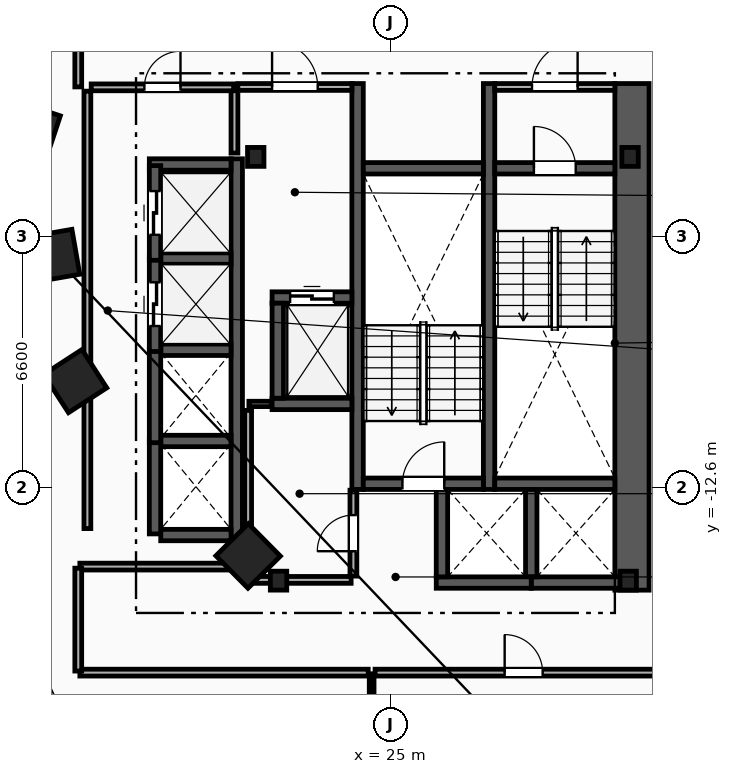
"""IFC4 building model, lengths in metres.
Left out: names, types, materials, properties, quantities, classifications, styles, units other than length and angle.
Written with IfcOpenShell. Run it as: python <this file> out.ifc"""

import sys

from ifc_helpers import new_model, si_unit, direction, frame, frame_2d, origin, origin_2d, place, context, subcontext, project, spatial, rectangle, i_section, extrude, element, fill, save


model = new_model("IFC4")
c1 = context("Model", 3, precision=1e-05, world=origin(), true_north=direction((0.0, 1.0)))
c2 = subcontext(c1, "Body", "Model", "MODEL_VIEW")
j1 = project(units=[si_unit("LENGTHUNIT", "METRE"), si_unit("PLANEANGLEUNIT", "RADIAN")], contexts=[c1])
p1 = place(None, origin())
s1 = spatial("IfcSite", under=j1, at=p1, CompositionType="ELEMENT")
p2 = place(p1, origin())
s2 = spatial("IfcBuilding", under=s1, at=p2, CompositionType="ELEMENT")
p3 = place(p2, frame((0.0, 0.0, 62.0)))
s3 = spatial("IfcBuildingStorey", under=s2, at=p3, CompositionType="ELEMENT", Elevation=62.0)
for number, where, z_axis, x_axis in (
    (1, (31.3, -3.9, 0.0), (0.0, 0.0, 1.0), (1.0, 0.0, 0.0)),
    (2, (21.45, -3.9, 0.0), (0.0, 0.0, 1.0), (1.0, 0.0, 0.0)),
    (3, (22.05, -15.05, 0.0), (0.0, 0.0, 1.0), (1.0, 0.0, 0.0)),
    (4, (31.25, -15.05, 0.0), (0.0, 0.0, 1.0), (1.0, 0.0, 0.0)),
):
    element("IfcColumn", number, at=place(p3, frame(where, z_axis=z_axis, x_axis=x_axis)), inside=s3, PredefinedType="COLUMN", context=c2, shape_type="SweptSolid", body=[
        extrude(i_section(OverallWidth=0.432, OverallDepth=0.498, WebThickness=0.056, FlangeThickness=0.089, FilletRadius=0.018, at=origin_2d()), origin(), (0.0, 0.0, 1.0), 3.8),
    ])
for number, where, z_axis, x_axis in (
    (5, (15.55, -3.2, 0.0), (0.0, 0.0, 1.0), (-0.315, -0.949, 0.0)),
    (6, (16.125, -6.5, 0.0), (0.0, 0.0, 1.0), (0.172, -0.985, 0.0)),
    (7, (16.7, -9.8, 0.0), (0.0, 0.0, 1.0), (0.544, -0.839, 0.0)),
    (8, (21.25, -14.4, 0.0), (0.0, 0.0, 1.0), (0.703, -0.711, 0.0)),
):
    element("IfcColumn", number, at=place(p3, frame(where, z_axis=z_axis, x_axis=x_axis)), inside=s3, PredefinedType="COLUMN", context=c2, shape_type="SweptSolid", body=[
        extrude(rectangle(XDim=1.2, YDim=1.2, at=origin_2d()), origin(), (0.0, 0.0, 1.0), 3.8),
    ])
p4 = place(p3, frame((31.35, -15.3, 0.0), z_axis=(0.0, 0.0, 1.0), x_axis=(0.0, 1.0, 0.0)))
e9 = element("IfcWall", 9, at=p4, inside=s3, PredefinedType="SHEAR", context=c2, shape_type="SweptSolid", body=[
    extrude(rectangle(XDim=13.33, YDim=0.9, at=frame_2d((6.665, 0.0))), origin(), (0.0, 0.0, 1.0), 3.5),
])
for number, where, z_axis, x_axis in (
    (10, (27.59, -12.65, 0.0), (0.0, 0.0, 1.0), (0.0, 1.0, 0.0)),
    (11, (24.13, -12.65, 0.0), (0.0, 0.0, 1.0), (0.0, 1.0, 0.0)),
):
    element("IfcWall", number, at=place(p3, frame(where, z_axis=z_axis, x_axis=x_axis)), inside=s3, PredefinedType="SHEAR", context=c2, shape_type="SweptSolid", body=[
        extrude(rectangle(XDim=10.68, YDim=0.3, at=frame_2d((5.34, 0.0))), origin(), (0.0, 0.0, 1.0), 3.5),
    ])
p5 = place(p3, frame((27.74, -4.2, 0.0), z_axis=(0.0, 0.0, 1.0), x_axis=(1.0, 0.0, 0.0)))
e12 = element("IfcWall", 12, at=p5, inside=s3, PredefinedType="SHEAR", context=c2, shape_type="SweptSolid", body=[
    extrude(rectangle(XDim=3.16, YDim=0.3, at=frame_2d((1.58, 0.0))), origin(), (0.0, 0.0, 1.0), 3.5),
])
p6 = place(p5, frame((1.03, 0.0, 0.0)))
e13 = element("IfcOpeningElement", 13, at=p6, cuts=e12, PredefinedType="OPENING", context=c2, shape_type="SweptSolid", body=[
    extrude(rectangle(XDim=1.1, YDim=2.15, at=frame_2d((0.55, 1.075))), frame((0.0, 0.16, 0.0), z_axis=(0.0, -1.0, 0.0), x_axis=(1.0, 0.0, 0.0)), (0.0, 0.0, 1.0), 0.32),
])
p7 = place(p3, frame((27.74, -12.5, 0.0), z_axis=(0.0, 0.0, 1.0), x_axis=(1.0, 0.0, 0.0)))
e14 = element("IfcWall", 14, at=p7, inside=s3, PredefinedType="SHEAR", context=c2, shape_type="SweptSolid", body=[
    extrude(rectangle(XDim=3.16, YDim=0.3, at=frame_2d((1.58, 0.0))), origin(), (0.0, 0.0, 1.0), 3.5),
])
p8 = place(p3, frame((24.28, -12.5, 0.0), z_axis=(0.0, 0.0, 1.0), x_axis=(1.0, 0.0, 0.0)))
e15 = element("IfcWall", 15, at=p8, inside=s3, PredefinedType="SHEAR", context=c2, shape_type="SweptSolid", body=[
    extrude(rectangle(XDim=3.16, YDim=0.3, at=frame_2d((1.58, 0.0))), origin(), (0.0, 0.0, 1.0), 3.5),
])
p9 = place(p8, frame((1.03, 0.0, 0.0)))
e16 = element("IfcOpeningElement", 16, at=p9, cuts=e15, PredefinedType="OPENING", context=c2, shape_type="SweptSolid", body=[
    extrude(rectangle(XDim=1.1, YDim=2.15, at=frame_2d((0.55, 1.075))), frame((0.0, 0.16, 0.0), z_axis=(0.0, -1.0, 0.0), x_axis=(1.0, 0.0, 0.0)), (0.0, 0.0, 1.0), 0.32),
])
p10 = place(p3, frame((24.28, -4.2, 0.0), z_axis=(0.0, 0.0, 1.0), x_axis=(1.0, 0.0, 0.0)))
e17 = element("IfcWall", 17, at=p10, inside=s3, PredefinedType="SHEAR", context=c2, shape_type="SweptSolid", body=[
    extrude(rectangle(XDim=3.16, YDim=0.3, at=frame_2d((1.58, 0.0))), origin(), (0.0, 0.0, 1.0), 3.5),
])
p11 = place(p3, frame((20.89, -3.8, 0.0), z_axis=(0.0, 0.0, 1.0), x_axis=(0.0, 1.0, 0.0)))
e18 = element("IfcWall", 18, at=p11, inside=s3, PredefinedType="PARTITIONING", context=c2, shape_type="SweptSolid", body=[
    extrude(rectangle(XDim=1.65, YDim=0.18, at=frame_2d((0.825, 0.0))), origin(), (0.0, 0.0, 1.0), 3.5),
])
p12 = place(p3, frame((20.98, -2.06, 0.0), z_axis=(0.0, 0.0, 1.0), x_axis=(1.0, 0.0, 0.0)))
e19 = element("IfcWall", 19, at=p12, inside=s3, PredefinedType="PARTITIONING", context=c2, shape_type="SweptSolid", body=[
    extrude(rectangle(XDim=3.0, YDim=0.18, at=frame_2d((1.5, 0.0))), origin(), (0.0, 0.0, 1.0), 3.5),
])
p13 = place(p12, frame((0.9, 0.0, 0.0)))
e20 = element("IfcOpeningElement", 20, at=p13, cuts=e19, PredefinedType="OPENING", context=c2, shape_type="SweptSolid", body=[
    extrude(rectangle(XDim=1.2, YDim=2.15, at=frame_2d((0.6, 1.075))), frame((0.0, 0.1, 0.0), z_axis=(0.0, -1.0, 0.0), x_axis=(1.0, 0.0, 0.0)), (0.0, 0.0, 1.0), 0.2),
])
p14 = place(p3, frame((27.74, -2.06, 0.0), z_axis=(0.0, 0.0, 1.0), x_axis=(1.0, 0.0, 0.0)))
e21 = element("IfcWall", 21, at=p14, inside=s3, PredefinedType="PARTITIONING", context=c2, shape_type="SweptSolid", body=[
    extrude(rectangle(XDim=3.16, YDim=0.18, at=frame_2d((1.58, 0.0))), origin(), (0.0, 0.0, 1.0), 3.5),
])
p15 = place(p14, frame((0.98, 0.0, 0.0)))
e22 = element("IfcOpeningElement", 22, at=p15, cuts=e21, PredefinedType="OPENING", context=c2, shape_type="SweptSolid", body=[
    extrude(rectangle(XDim=1.2, YDim=2.15, at=frame_2d((0.6, 1.075))), frame((0.0, 0.1, 0.0), z_axis=(0.0, -1.0, 0.0), x_axis=(1.0, 0.0, 0.0)), (0.0, 0.0, 1.0), 0.2),
])
p16 = place(p3, frame((21.88, -7.6, 0.0), z_axis=(0.0, 0.0, 1.0), x_axis=(1.0, 0.0, 0.0)))
e23 = element("IfcWall", 23, at=p16, inside=s3, PredefinedType="SHEAR", context=c2, shape_type="SweptSolid", body=[
    extrude(rectangle(XDim=2.1, YDim=0.3, at=frame_2d((1.05, 0.0))), origin(), (0.0, 0.0, 1.0), 3.5),
])
p17 = place(p16, frame((0.475, 0.0, 0.0)))
e24 = element("IfcOpeningElement", 24, at=p17, cuts=e23, PredefinedType="OPENING", context=c2, shape_type="SweptSolid", body=[
    extrude(rectangle(XDim=1.15, YDim=2.2, at=frame_2d((0.575, 1.1))), frame((0.0, 0.16, 0.0), z_axis=(0.0, -1.0, 0.0), x_axis=(1.0, 0.0, 0.0)), (0.0, 0.0, 1.0), 0.32),
])
p18 = place(p3, frame((21.88, -10.4, 0.0), z_axis=(0.0, 0.0, 1.0), x_axis=(1.0, 0.0, 0.0)))
e25 = element("IfcWall", 25, at=p18, inside=s3, PredefinedType="SHEAR", context=c2, shape_type="SweptSolid", body=[
    extrude(rectangle(XDim=2.1, YDim=0.3, at=frame_2d((1.05, 0.0))), origin(), (0.0, 0.0, 1.0), 3.5),
])
for number, where, z_axis, x_axis in (
    (26, (22.03, -10.25, 0.0), (0.0, 0.0, 1.0), (0.0, 1.0, 0.0)),
    (27, (28.7, -15.1, 0.0), (0.0, 0.0, 1.0), (1.0, 0.0, 0.0)),
):
    element("IfcWall", number, at=place(p3, frame(where, z_axis=z_axis, x_axis=x_axis)), inside=s3, PredefinedType="SHEAR", context=c2, shape_type="SweptSolid", body=[
        extrude(rectangle(XDim=2.5, YDim=0.3, at=frame_2d((1.25, 0.0))), origin(), (0.0, 0.0, 1.0), 3.5),
    ])
p19 = place(p3, frame((28.7, -14.95, 0.0), z_axis=(0.0, 0.0, 1.0), x_axis=(0.0, 1.0, 0.0)))
e28 = element("IfcWall", 28, at=p19, inside=s3, PredefinedType="SHEAR", context=c2, shape_type="SweptSolid", body=[
    extrude(rectangle(XDim=2.3, YDim=0.3, at=frame_2d((1.15, 0.0))), origin(), (0.0, 0.0, 1.0), 3.5),
])
p20 = place(p3, frame((26.2, -15.1, 0.0), z_axis=(0.0, 0.0, 1.0), x_axis=(1.0, 0.0, 0.0)))
e29 = element("IfcWall", 29, at=p20, inside=s3, PredefinedType="SHEAR", context=c2, shape_type="SweptSolid", body=[
    extrude(rectangle(XDim=2.5, YDim=0.3, at=frame_2d((1.25, 0.0))), origin(), (0.0, 0.0, 1.0), 3.5),
])
p21 = place(p3, frame((26.35, -14.95, 0.0), z_axis=(0.0, 0.0, 1.0), x_axis=(0.0, 1.0, 0.0)))
e30 = element("IfcWall", 30, at=p21, inside=s3, PredefinedType="SHEAR", context=c2, shape_type="SweptSolid", body=[
    extrude(rectangle(XDim=2.3, YDim=0.3, at=frame_2d((1.15, 0.0))), origin(), (0.0, 0.0, 1.0), 3.5),
])
p22 = place(p3, frame((20.95, -14.0, 0.0), z_axis=(0.0, 0.0, 1.0), x_axis=(0.0, 1.0, 0.0)))
e31 = element("IfcWall", 31, at=p22, inside=s3, PredefinedType="SHEAR", context=c2, shape_type="SweptSolid", body=[
    extrude(rectangle(XDim=10.05, YDim=0.3, at=frame_2d((5.025, 0.0))), origin(), (0.0, 0.0, 1.0), 3.5),
])
p23 = place(p3, frame((18.95, -13.85, 0.0), z_axis=(0.0, 0.0, 1.0), x_axis=(1.0, 0.0, 0.0)))
e32 = element("IfcWall", 32, at=p23, inside=s3, PredefinedType="SHEAR", context=c2, shape_type="SweptSolid", body=[
    extrude(rectangle(XDim=1.85, YDim=0.3, at=frame_2d((0.925, 0.0))), origin(), (0.0, 0.0, 1.0), 3.5),
])
p24 = place(p3, frame((18.65, -4.1, 0.0), z_axis=(0.0, 0.0, 1.0), x_axis=(1.0, 0.0, 0.0)))
e33 = element("IfcWall", 33, at=p24, inside=s3, PredefinedType="SHEAR", context=c2, shape_type="SweptSolid", body=[
    extrude(rectangle(XDim=2.15, YDim=0.3, at=frame_2d((1.075, 0.0))), origin(), (0.0, 0.0, 1.0), 3.5),
])
for number, where, z_axis, x_axis in (
    (34, (18.95, -11.375, 0.0), (0.0, 0.0, 1.0), (1.0, 0.0, 0.0)),
    (35, (18.95, -8.975, 0.0), (0.0, 0.0, 1.0), (1.0, 0.0, 0.0)),
    (36, (18.95, -6.575, 0.0), (0.0, 0.0, 1.0), (1.0, 0.0, 0.0)),
):
    element("IfcWall", number, at=place(p3, frame(where, z_axis=z_axis, x_axis=x_axis)), inside=s3, PredefinedType="SHEAR", context=c2, shape_type="SweptSolid", body=[
        extrude(rectangle(XDim=1.85, YDim=0.3, at=frame_2d((0.925, 0.0))), origin(), (0.0, 0.0, 1.0), 3.5),
    ])
for number, where, z_axis, x_axis in (
    (37, (18.8, -13.82, 0.0), (0.0, 0.0, 1.0), (0.0, 1.0, 0.0)),
    (38, (18.8, -11.42, 0.0), (0.0, 0.0, 1.0), (0.0, 1.0, 0.0)),
):
    element("IfcWall", number, at=place(p3, frame(where, z_axis=z_axis, x_axis=x_axis)), inside=s3, PredefinedType="SHEAR", context=c2, shape_type="SweptSolid", body=[
        extrude(rectangle(XDim=2.49, YDim=0.3, at=frame_2d((1.245, 0.0))), origin(), (0.0, 0.0, 1.0), 3.5),
    ])
p25 = place(p3, frame((18.8, -9.02, 0.0), z_axis=(0.0, 0.0, 1.0), x_axis=(0.0, 1.0, 0.0)))
e39 = element("IfcWall", 39, at=p25, inside=s3, PredefinedType="SHEAR", context=c2, shape_type="SweptSolid", body=[
    extrude(rectangle(XDim=2.49, YDim=0.3, at=frame_2d((1.245, 0.0))), origin(), (0.0, 0.0, 1.0), 3.5),
])
p26 = place(p25, frame((0.67, 0.0, 0.0)))
e40 = element("IfcOpeningElement", 40, at=p26, cuts=e39, PredefinedType="OPENING", context=c2, shape_type="SweptSolid", body=[
    extrude(rectangle(XDim=1.15, YDim=2.2, at=frame_2d((0.575, 1.1))), frame((0.0, 0.16, 0.0), z_axis=(0.0, -1.0, 0.0), x_axis=(1.0, 0.0, 0.0)), (0.0, 0.0, 1.0), 0.32),
])
p27 = place(p3, frame((18.8, -6.62, 0.0), z_axis=(0.0, 0.0, 1.0), x_axis=(0.0, 1.0, 0.0)))
e41 = element("IfcWall", 41, at=p27, inside=s3, PredefinedType="SHEAR", context=c2, shape_type="SweptSolid", body=[
    extrude(rectangle(XDim=2.49, YDim=0.3, at=frame_2d((1.245, 0.0))), origin(), (0.0, 0.0, 1.0), 3.5),
])
p28 = place(p27, frame((0.67, 0.0, 0.0)))
e42 = element("IfcOpeningElement", 42, at=p28, cuts=e41, PredefinedType="OPENING", context=c2, shape_type="SweptSolid", body=[
    extrude(rectangle(XDim=1.15, YDim=2.2, at=frame_2d((0.575, 1.1))), frame((0.0, 0.16, 0.0), z_axis=(0.0, -1.0, 0.0), x_axis=(1.0, 0.0, 0.0)), (0.0, 0.0, 1.0), 0.32),
])
p29 = place(p3, frame((17.02, -13.68, 0.0), z_axis=(0.0, 0.0, 1.0), x_axis=(0.0, 1.0, 0.0)))
e43 = element("IfcWall", 43, at=p29, inside=s3, PredefinedType="PARTITIONING", context=c2, shape_type="SweptSolid", body=[
    extrude(rectangle(XDim=11.51, YDim=0.18, at=frame_2d((5.755, 0.0))), origin(), (0.0, 0.0, 1.0), 3.5),
])
p30 = place(p3, frame((17.12, -2.07, 0.0), z_axis=(0.0, 0.0, 1.0), x_axis=(1.0, 0.0, 0.0)))
e44 = element("IfcWall", 44, at=p30, inside=s3, PredefinedType="PARTITIONING", context=c2, shape_type="SweptSolid", body=[
    extrude(rectangle(XDim=3.75, YDim=0.18, at=frame_2d((1.875, 0.0))), origin(), (0.0, 0.0, 1.0), 3.5),
])
p31 = place(p30, frame((1.4, 0.0, 0.0)))
e45 = element("IfcOpeningElement", 45, at=p31, cuts=e44, PredefinedType="OPENING", context=c2, shape_type="SweptSolid", body=[
    extrude(rectangle(XDim=0.95, YDim=2.1, at=frame_2d((0.475, 1.05))), frame((0.0, 0.1, 0.0), z_axis=(0.0, -1.0, 0.0), x_axis=(1.0, 0.0, 0.0)), (0.0, 0.0, 1.0), 0.2),
])
p32 = place(p3, frame((21.27, -10.4, 0.0), z_axis=(0.0, 0.0, 1.0), x_axis=(1.0, 0.0, 0.0)))
e46 = element("IfcWall", 46, at=p32, inside=s3, PredefinedType="PARTITIONING", context=c2, shape_type="SweptSolid", body=[
    extrude(rectangle(XDim=0.59, YDim=0.14, at=frame_2d((0.295, 0.0))), origin(), (0.0, 0.0, 1.0), 3.5),
])
p33 = place(p3, frame((21.25, -14.93, 0.0), z_axis=(0.0, 0.0, 1.0), x_axis=(0.0, 1.0, 0.0)))
e47 = element("IfcWall", 47, at=p33, inside=s3, PredefinedType="PARTITIONING", context=c2, shape_type="SweptSolid", body=[
    extrude(rectangle(XDim=4.36, YDim=0.18, at=frame_2d((2.18, 0.0))), origin(), (0.0, 0.0, 1.0), 3.5),
])
p34 = place(p3, frame((21.35, -15.03, 0.0), z_axis=(0.0, 0.0, 1.0), x_axis=(1.0, 0.0, 0.0)))
e48 = element("IfcWall", 48, at=p34, inside=s3, PredefinedType="PARTITIONING", context=c2, shape_type="SweptSolid", body=[
    extrude(rectangle(XDim=2.61, YDim=0.18, at=frame_2d((1.305, 0.0))), origin(), (0.0, 0.0, 1.0), 2.573),
])
p35 = place(p3, frame((24.02, -14.93, 0.0), z_axis=(0.0, 0.0, 1.0), x_axis=(0.0, 1.0, 0.0)))
e49 = element("IfcWall", 49, at=p35, inside=s3, PredefinedType="PARTITIONING", context=c2, shape_type="SweptSolid", body=[
    extrude(rectangle(XDim=2.26, YDim=0.18, at=frame_2d((1.13, 0.0))), origin(), (0.0, 0.0, 1.0), 3.5),
])
p36 = place(p35, frame((0.655, 0.0, 0.0)))
e50 = element("IfcOpeningElement", 50, at=p36, cuts=e49, PredefinedType="OPENING", context=c2, shape_type="SweptSolid", body=[
    extrude(rectangle(XDim=0.95, YDim=2.1, at=frame_2d((0.475, 1.05))), frame((0.0, 0.1, 0.0), z_axis=(0.0, -1.0, 0.0), x_axis=(1.0, 0.0, 0.0)), (0.0, 0.0, 1.0), 0.2),
])
p37 = place(p3, frame((24.5, -24.772, 0.0), z_axis=(0.0, 0.0, 1.0), x_axis=(0.0, 1.0, 0.0)))
e51 = element("IfcWall", 51, at=p37, inside=s3, PredefinedType="PARTITIONING", context=c2, shape_type="SweptSolid", body=[
    extrude(rectangle(XDim=7.272, YDim=0.125, at=frame_2d((3.636, 0.0))), origin(), (0.0, 0.0, 1.0), 3.5),
])
p38 = place(p3, frame((24.59, -17.47, 0.0), z_axis=(0.0, 0.0, 1.0), x_axis=(1.0, 0.0, 0.0)))
e52 = element("IfcWall", 52, at=p38, inside=s3, PredefinedType="PARTITIONING", context=c2, shape_type="SweptSolid", body=[
    extrude(rectangle(XDim=7.82, YDim=0.18, at=frame_2d((3.91, 0.0))), origin(), (0.0, 0.0, 1.0), 3.5),
])
p39 = place(p38, frame((3.41, 0.0, 0.0)))
e53 = element("IfcOpeningElement", 53, at=p39, cuts=e52, PredefinedType="OPENING", context=c2, shape_type="SweptSolid", body=[
    extrude(rectangle(XDim=1.0, YDim=2.15, at=frame_2d((0.5, 1.075))), frame((0.0, 0.1, 0.0), z_axis=(0.0, -1.0, 0.0), x_axis=(1.0, 0.0, 0.0)), (0.0, 0.0, 1.0), 0.2),
])
p40 = place(p3, frame((16.822, -17.47, 0.0), z_axis=(0.0, 0.0, 1.0), x_axis=(1.0, 0.0, 0.0)))
e54 = element("IfcWall", 54, at=p40, inside=s3, PredefinedType="PARTITIONING", context=c2, shape_type="SweptSolid", body=[
    extrude(rectangle(XDim=7.588, YDim=0.18, at=frame_2d((3.794, 0.0))), origin(), (0.0, 0.0, 1.0), 3.5),
])
p41 = place(p3, frame((21.178, -14.68, 0.0), z_axis=(0.0, 0.0, 1.0), x_axis=(-1.0, 0.0, 0.0)))
e55 = element("IfcWall", 55, at=p41, inside=s3, PredefinedType="PARTITIONING", context=c2, shape_type="SweptSolid", body=[
    extrude(rectangle(XDim=4.357, YDim=0.18, at=frame_2d((2.178, 0.0))), origin(), (0.0, 0.0, 1.0), 3.5),
])
p42 = place(p3, frame((16.78, -14.721, 0.0), z_axis=(0.0, 0.0, 1.0), x_axis=(0.0, -1.0, 0.0)))
e56 = element("IfcWall", 56, at=p42, inside=s3, PredefinedType="PARTITIONING", context=c2, shape_type="SweptSolid", body=[
    extrude(rectangle(XDim=2.707, YDim=0.18, at=frame_2d((1.354, 0.0))), origin(), (0.0, 0.0, 1.0), 3.5),
])
p43 = place(p3, frame((16.78, 0.329, 0.0), z_axis=(0.0, 0.0, 1.0), x_axis=(0.0, -1.0, 0.0)))
e57 = element("IfcWall", 57, at=p43, inside=s3, PredefinedType="PARTITIONING", context=c2, shape_type="SweptSolid", body=[
    extrude(rectangle(XDim=2.387, YDim=0.18, at=frame_2d((1.194, 0.0))), origin(), (0.0, 0.0, 1.0), 3.5),
])
p44 = place(p6, origin())
e58 = element("IfcDoor", 58, at=p44, inside=s3, OperationType="SINGLE_SWING_LEFT", PredefinedType="DOOR", context=c2, shape_type="SweptSolid", body=[
    extrude(rectangle(XDim=1.1, YDim=2.15, at=frame_2d((0.55, 1.075))), frame((0.0, 0.025, 0.0), z_axis=(0.0, -1.0, 0.0), x_axis=(1.0, 0.0, 0.0)), (0.0, 0.0, 1.0), 0.05),
])
fill(e13, e58)
p45 = place(p9, origin())
e59 = element("IfcDoor", 59, at=p45, inside=s3, OperationType="SINGLE_SWING_RIGHT", PredefinedType="DOOR", context=c2, shape_type="SweptSolid", body=[
    extrude(rectangle(XDim=1.1, YDim=2.15, at=frame_2d((0.55, 1.075))), frame((0.0, 0.025, 0.0), z_axis=(0.0, -1.0, 0.0), x_axis=(1.0, 0.0, 0.0)), (0.0, 0.0, 1.0), 0.05),
])
fill(e16, e59)
p46 = place(p13, origin())
e60 = element("IfcDoor", 60, at=p46, inside=s3, OperationType="SINGLE_SWING_LEFT", PredefinedType="DOOR", context=c2, shape_type="SweptSolid", body=[
    extrude(rectangle(XDim=1.2, YDim=2.15, at=frame_2d((0.6, 1.075))), frame((0.0, 0.025, 0.0), z_axis=(0.0, -1.0, 0.0), x_axis=(1.0, 0.0, 0.0)), (0.0, 0.0, 1.0), 0.05),
])
fill(e20, e60)
p47 = place(p15, origin())
e61 = element("IfcDoor", 61, at=p47, inside=s3, OperationType="SINGLE_SWING_RIGHT", PredefinedType="DOOR", context=c2, shape_type="SweptSolid", body=[
    extrude(rectangle(XDim=1.2, YDim=2.15, at=frame_2d((0.6, 1.075))), frame((0.0, 0.025, 0.0), z_axis=(0.0, -1.0, 0.0), x_axis=(1.0, 0.0, 0.0)), (0.0, 0.0, 1.0), 0.05),
])
fill(e22, e61)
p48 = place(p17, origin())
e62 = element("IfcDoor", 62, at=p48, inside=s3, OperationType="SLIDING_TO_LEFT", PredefinedType="TRAPDOOR", context=c2, shape_type="SweptSolid", body=[
    extrude(rectangle(XDim=1.15, YDim=2.2, at=frame_2d((0.575, 1.1))), frame((0.0, 0.025, 0.0), z_axis=(0.0, -1.0, 0.0), x_axis=(1.0, 0.0, 0.0)), (0.0, 0.0, 1.0), 0.05),
])
fill(e24, e62)
p49 = place(p26, origin())
e63 = element("IfcDoor", 63, at=p49, inside=s3, OperationType="SLIDING_TO_LEFT", PredefinedType="TRAPDOOR", context=c2, shape_type="SweptSolid", body=[
    extrude(rectangle(XDim=1.15, YDim=2.2, at=frame_2d((0.575, 1.1))), frame((0.0, 0.025, 0.0), z_axis=(0.0, -1.0, 0.0), x_axis=(1.0, 0.0, 0.0)), (0.0, 0.0, 1.0), 0.05),
])
fill(e40, e63)
p50 = place(p28, origin())
e64 = element("IfcDoor", 64, at=p50, inside=s3, OperationType="SLIDING_TO_LEFT", PredefinedType="TRAPDOOR", context=c2, shape_type="SweptSolid", body=[
    extrude(rectangle(XDim=1.15, YDim=2.2, at=frame_2d((0.575, 1.1))), frame((0.0, 0.025, 0.0), z_axis=(0.0, -1.0, 0.0), x_axis=(1.0, 0.0, 0.0)), (0.0, 0.0, 1.0), 0.05),
])
fill(e42, e64)
p51 = place(p39, origin())
e65 = element("IfcDoor", 65, at=p51, inside=s3, OperationType="SINGLE_SWING_LEFT", PredefinedType="DOOR", context=c2, shape_type="SweptSolid", body=[
    extrude(rectangle(XDim=1.0, YDim=2.15, at=frame_2d((0.5, 1.075))), frame((0.0, 0.025, 0.0), z_axis=(0.0, -1.0, 0.0), x_axis=(1.0, 0.0, 0.0)), (0.0, 0.0, 1.0), 0.05),
])
fill(e53, e65)
p52 = place(p31, origin())
e66 = element("IfcDoor", 66, at=p52, inside=s3, OperationType="SINGLE_SWING_RIGHT", PredefinedType="DOOR", context=c2, shape_type="SweptSolid", body=[
    extrude(rectangle(XDim=0.95, YDim=2.1, at=frame_2d((0.475, 1.05))), frame((0.0, 0.025, 0.0), z_axis=(0.0, -1.0, 0.0), x_axis=(1.0, 0.0, 0.0)), (0.0, 0.0, 1.0), 0.05),
])
fill(e45, e66)
p53 = place(p36, origin())
e67 = element("IfcDoor", 67, at=p53, inside=s3, OperationType="SINGLE_SWING_LEFT", PredefinedType="DOOR", context=c2, shape_type="SweptSolid", body=[
    extrude(rectangle(XDim=0.95, YDim=2.1, at=frame_2d((0.475, 1.05))), frame((0.0, 0.025, 0.0), z_axis=(0.0, -1.0, 0.0), x_axis=(1.0, 0.0, 0.0)), (0.0, 0.0, 1.0), 0.05),
])
fill(e50, e67)
save(model, sys.argv[1])
